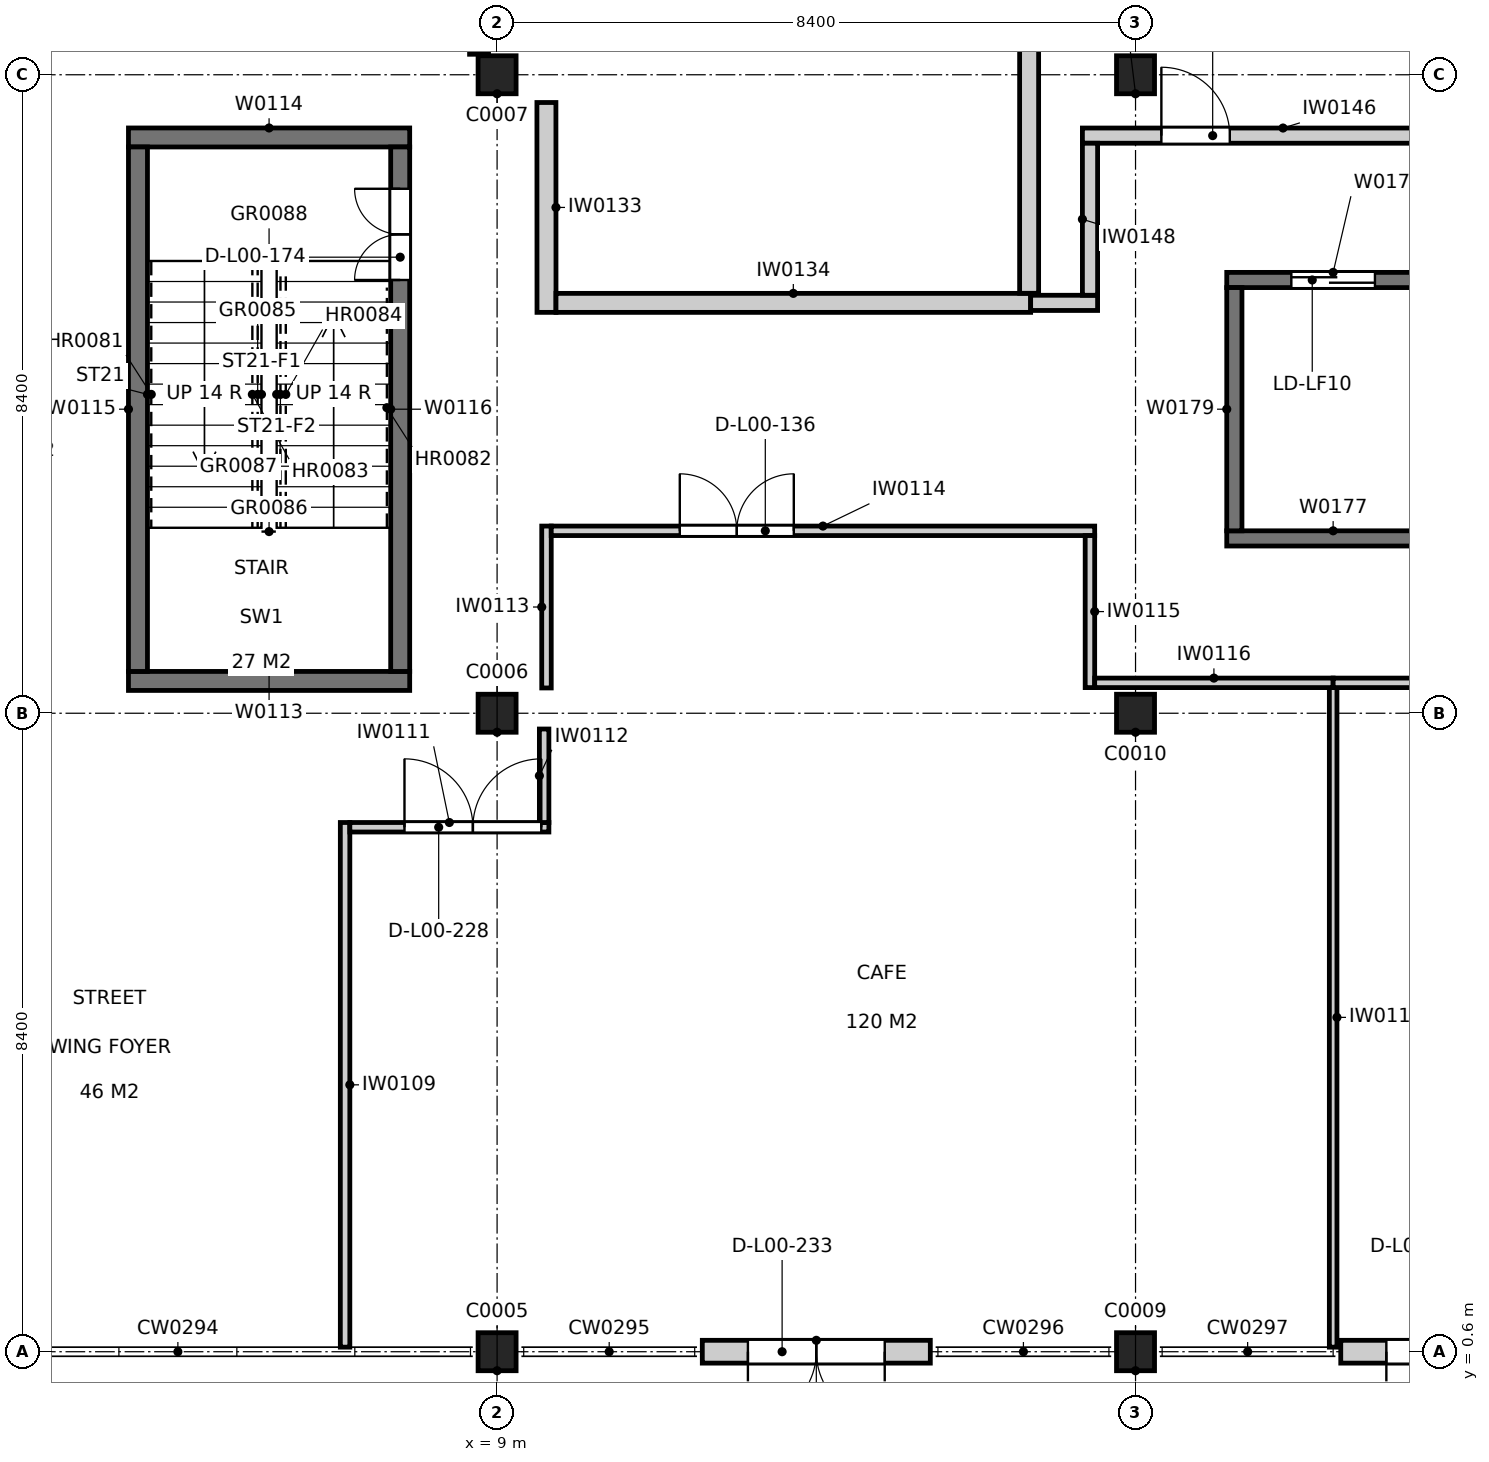
"""IFC4 building model, lengths in metres.
Left out: names, types, materials, properties, quantities, classifications, styles, units other than length and angle.
Written with IfcOpenShell. Run it as: python <this file> out.ifc"""

import sys

from ifc_helpers import new_model, si_unit, direction, frame, frame_2d, origin, origin_2d, place, context, subcontext, project, spatial, rectangle, extrude, element, fill, save


model = new_model("IFC4")
c1 = context("Model", 3, precision=1e-05, world=origin(), true_north=direction((0.0, 1.0)))
c2 = subcontext(c1, "Body", "Model", "MODEL_VIEW")
j1 = project(units=[si_unit("LENGTHUNIT", "METRE"), si_unit("PLANEANGLEUNIT", "RADIAN")], contexts=[c1])
p1 = place(None, origin())
s1 = spatial("IfcSite", under=j1, at=p1, CompositionType="ELEMENT")
p2 = place(p1, origin())
s2 = spatial("IfcBuilding", under=s1, at=p2, CompositionType="ELEMENT")
p3 = place(p2, origin())
s3 = spatial("IfcBuildingStorey", under=s2, at=p3, CompositionType="ELEMENT", Elevation=0.0)
for number, where, z_axis, x_axis in (
    (1, (9.0, 0.6, 0.0), (0.0, 0.0, 1.0), (1.0, 0.0, 0.0)),
    (2, (9.0, 9.0, 0.0), (0.0, 0.0, 1.0), (1.0, 0.0, 0.0)),
    (3, (9.0, 17.4, 0.0), (0.0, 0.0, 1.0), (1.0, 0.0, 0.0)),
    (4, (17.4, 0.6, 0.0), (0.0, 0.0, 1.0), (1.0, 0.0, 0.0)),
    (5, (17.4, 9.0, 0.0), (0.0, 0.0, 1.0), (1.0, 0.0, 0.0)),
    (6, (17.4, 17.4, 0.0), (0.0, 0.0, 1.0), (1.0, 0.0, 0.0)),
):
    element("IfcColumn", number, at=place(p3, frame(where, z_axis=z_axis, x_axis=x_axis)), inside=s3, PredefinedType="COLUMN", context=c2, shape_type="SweptSolid", body=[
        extrude(rectangle(XDim=0.5, YDim=0.5, at=origin_2d()), origin(), (0.0, 0.0, 1.0), 4.8),
    ])
for number, where, z_axis, x_axis in (
    (7, (4.15, 9.425, 0.0), (0.0, 0.0, 1.0), (1.0, 0.0, 0.0)),
    (8, (4.15, 16.575, 0.0), (0.0, 0.0, 1.0), (1.0, 0.0, 0.0)),
):
    element("IfcWall", number, at=place(p3, frame(where, z_axis=z_axis, x_axis=x_axis)), inside=s3, PredefinedType="SOLIDWALL", context=c2, shape_type="SweptSolid", body=[
        extrude(rectangle(XDim=3.7, YDim=0.25, at=frame_2d((1.85, 0.0))), origin(), (0.0, 0.0, 1.0), 4.8),
    ])
p4 = place(p3, frame((4.275, 9.55, 0.0), z_axis=(0.0, 0.0, 1.0), x_axis=(0.0, 1.0, 0.0)))
e9 = element("IfcWall", 9, at=p4, inside=s3, PredefinedType="SOLIDWALL", context=c2, shape_type="SweptSolid", body=[
    extrude(rectangle(XDim=6.9, YDim=0.25, at=frame_2d((3.45, 0.0))), origin(), (0.0, 0.0, 1.0), 4.8),
])
p5 = place(p3, frame((7.725, 9.55, 0.0), z_axis=(0.0, 0.0, 1.0), x_axis=(0.0, 1.0, 0.0)))
e10 = element("IfcWall", 10, at=p5, inside=s3, PredefinedType="SOLIDWALL", context=c2, shape_type="SweptSolid", body=[
    extrude(rectangle(XDim=6.9, YDim=0.25, at=frame_2d((3.45, 0.0))), origin(), (0.0, 0.0, 1.0), 4.8),
])
p6 = place(p5, frame((5.15, 0.0, 0.0)))
e11 = element("IfcOpeningElement", 11, at=p6, cuts=e10, PredefinedType="OPENING", context=c2, shape_type="SweptSolid", body=[
    extrude(rectangle(XDim=1.2, YDim=2.1, at=frame_2d((0.6, 1.05))), frame((0.0, 0.135, 0.0), z_axis=(0.0, -1.0, 0.0), x_axis=(1.0, 0.0, 0.0)), (0.0, 0.0, 1.0), 0.27),
])
p7 = place(p3, frame((18.6, 11.3, 0.0), z_axis=(0.0, 0.0, 1.0), x_axis=(1.0, 0.0, 0.0)))
e12 = element("IfcWall", 12, at=p7, inside=s3, PredefinedType="SOLIDWALL", context=c2, shape_type="SweptSolid", body=[
    extrude(rectangle(XDim=2.8, YDim=0.2, at=frame_2d((1.4, 0.0))), origin(), (0.0, 0.0, 1.0), 4.8),
])
p8 = place(p3, frame((18.6, 14.7, 0.0), z_axis=(0.0, 0.0, 1.0), x_axis=(1.0, 0.0, 0.0)))
e13 = element("IfcWall", 13, at=p8, inside=s3, PredefinedType="SOLIDWALL", context=c2, shape_type="SweptSolid", body=[
    extrude(rectangle(XDim=2.8, YDim=0.2, at=frame_2d((1.4, 0.0))), origin(), (0.0, 0.0, 1.0), 4.8),
])
p9 = place(p8, frame((0.85, 0.0, 0.0)))
e14 = element("IfcOpeningElement", 14, at=p9, cuts=e13, PredefinedType="OPENING", context=c2, shape_type="SweptSolid", body=[
    extrude(rectangle(XDim=1.1, YDim=2.1, at=frame_2d((0.55, 1.05))), frame((0.0, 0.11, 0.0), z_axis=(0.0, -1.0, 0.0), x_axis=(1.0, 0.0, 0.0)), (0.0, 0.0, 1.0), 0.22),
])
p10 = place(p3, frame((18.7, 11.4, 0.0), z_axis=(0.0, 0.0, 1.0), x_axis=(0.0, 1.0, 0.0)))
e15 = element("IfcWall", 15, at=p10, inside=s3, PredefinedType="SOLIDWALL", context=c2, shape_type="SweptSolid", body=[
    extrude(rectangle(XDim=3.2, YDim=0.2, at=frame_2d((1.6, 0.0))), origin(), (0.0, 0.0, 1.0), 4.8),
])
p11 = place(p3, frame((7.0, 7.562, 0.0), z_axis=(0.0, 0.0, 1.0), x_axis=(0.0, -1.0, 0.0)))
e16 = element("IfcWall", 16, at=p11, inside=s3, PredefinedType="PARTITIONING", context=c2, shape_type="SweptSolid", body=[
    extrude(rectangle(XDim=6.902, YDim=0.125, at=frame_2d((3.451, 0.0))), origin(), (0.0, 0.0, 1.0), 4.04),
])
p12 = place(p3, frame((20.0, 9.337, 0.0), z_axis=(0.0, 0.0, 1.0), x_axis=(0.0, -1.0, 0.0)))
e17 = element("IfcWall", 17, at=p12, inside=s3, PredefinedType="PARTITIONING", context=c2, shape_type="SweptSolid", body=[
    extrude(rectangle(XDim=8.677, YDim=0.1, at=frame_2d((4.339, 0.0))), origin(), (0.0, 0.0, 1.0), 3.84),
])
p13 = place(p3, frame((7.062, 7.5, 0.0), z_axis=(0.0, 0.0, 1.0), x_axis=(1.0, 0.0, 0.0)))
e18 = element("IfcWall", 18, at=p13, inside=s3, PredefinedType="PARTITIONING", context=c2, shape_type="SweptSolid", body=[
    extrude(rectangle(XDim=2.619, YDim=0.125, at=frame_2d((1.31, 0.0))), origin(), (0.0, 0.0, 1.0), 3.84),
])
p14 = place(p13, frame((0.719, 0.0, 0.0)))
e19 = element("IfcOpeningElement", 19, at=p14, cuts=e18, PredefinedType="OPENING", context=c2, shape_type="SweptSolid", body=[
    extrude(rectangle(XDim=1.8, YDim=2.1, at=frame_2d((0.9, 1.05))), frame((0.0, 0.073, 0.0), z_axis=(0.0, -1.0, 0.0), x_axis=(1.0, 0.0, 0.0)), (0.0, 0.0, 1.0), 0.145),
])
p15 = place(p3, frame((9.619, 7.562, 0.0), z_axis=(0.0, 0.0, 1.0), x_axis=(0.0, 1.0, 0.0)))
e20 = element("IfcWall", 20, at=p15, inside=s3, PredefinedType="PARTITIONING", context=c2, shape_type="SweptSolid", body=[
    extrude(rectangle(XDim=1.23, YDim=0.125, at=frame_2d((0.615, 0.0))), origin(), (0.0, 0.0, 1.0), 4.64),
])
p16 = place(p3, frame((9.65, 9.333, 0.0), z_axis=(0.0, 0.0, 1.0), x_axis=(0.0, 1.0, 0.0)))
e21 = element("IfcWall", 21, at=p16, inside=s3, PredefinedType="PARTITIONING", context=c2, shape_type="SweptSolid", body=[
    extrude(rectangle(XDim=2.13, YDim=0.125, at=frame_2d((1.065, 0.0))), origin(), (0.0, 0.0, 1.0), 4.64),
])
p17 = place(p3, frame((9.712, 11.4, 0.0), z_axis=(0.0, 0.0, 1.0), x_axis=(1.0, 0.0, 0.0)))
e22 = element("IfcWall", 22, at=p17, inside=s3, PredefinedType="PARTITIONING", context=c2, shape_type="SweptSolid", body=[
    extrude(rectangle(XDim=7.15, YDim=0.125, at=frame_2d((3.575, 0.0))), origin(), (0.0, 0.0, 1.0), 4.64),
])
p18 = place(p17, frame((1.691, 0.0, 0.0)))
e23 = element("IfcOpeningElement", 23, at=p18, cuts=e22, PredefinedType="OPENING", context=c2, shape_type="SweptSolid", body=[
    extrude(rectangle(XDim=1.5, YDim=2.1, at=frame_2d((0.75, 1.05))), frame((0.0, 0.073, 0.0), z_axis=(0.0, -1.0, 0.0), x_axis=(1.0, 0.0, 0.0)), (0.0, 0.0, 1.0), 0.145),
])
p19 = place(p3, frame((16.8, 11.337, 0.0), z_axis=(0.0, 0.0, 1.0), x_axis=(0.0, -1.0, 0.0)))
e24 = element("IfcWall", 24, at=p19, inside=s3, PredefinedType="PARTITIONING", context=c2, shape_type="SweptSolid", body=[
    extrude(rectangle(XDim=2.0, YDim=0.125, at=frame_2d((1.0, 0.0))), origin(), (0.0, 0.0, 1.0), 4.64),
])
p20 = place(p3, frame((16.863, 9.4, 0.0), z_axis=(0.0, 0.0, 1.0), x_axis=(1.0, 0.0, 0.0)))
e25 = element("IfcWall", 25, at=p20, inside=s3, PredefinedType="PARTITIONING", context=c2, shape_type="SweptSolid", body=[
    extrude(rectangle(XDim=3.137, YDim=0.125, at=frame_2d((1.569, 0.0))), origin(), (0.0, 0.0, 1.0), 3.84),
])
p21 = place(p3, frame((20.0, 9.4, 0.0), z_axis=(0.0, 0.0, 1.0), x_axis=(1.0, 0.0, 0.0)))
e26 = element("IfcWall", 26, at=p21, inside=s3, PredefinedType="PARTITIONING", context=c2, shape_type="SweptSolid", body=[
    extrude(rectangle(XDim=3.262, YDim=0.125, at=frame_2d((1.631, 0.0))), origin(), (0.0, 0.0, 1.0), 4.64),
])
p22 = place(p21, frame((1.436, 0.0, 0.0)))
e27 = element("IfcOpeningElement", 27, at=p22, cuts=e26, PredefinedType="OPENING", context=c2, shape_type="SweptSolid", body=[
    extrude(rectangle(XDim=1.5, YDim=2.1, at=frame_2d((0.75, 1.05))), frame((0.0, 0.073, 0.0), z_axis=(0.0, -1.0, 0.0), x_axis=(1.0, 0.0, 0.0)), (0.0, 0.0, 1.0), 0.145),
])
p23 = place(p3, frame((8.76, 18.624, 0.0), z_axis=(0.0, 0.0, 1.0), x_axis=(0.0035823721, -0.999993583284, 0.0)))
e28 = element("IfcWall", 28, at=p23, inside=s3, PredefinedType="PARTITIONING", context=c2, shape_type="SweptSolid", body=[
    extrude(rectangle(XDim=0.954, YDim=0.25, at=frame_2d((0.477, 0.0))), origin(), (0.0, 0.0, 1.0), 3.84),
])
p24 = place(p3, frame((9.649, 17.035, 0.0), z_axis=(0.0, 0.0, 1.0), x_axis=(0.000442125697, -0.999999902262, 0.0)))
e29 = element("IfcWall", 29, at=p24, inside=s3, PredefinedType="PARTITIONING", context=c2, shape_type="SweptSolid", body=[
    extrude(rectangle(XDim=2.761, YDim=0.25, at=frame_2d((1.38, 0.0))), origin(), (0.0, 0.0, 1.0), 4.04),
])
p25 = place(p3, frame((9.775, 14.399, 0.0), z_axis=(0.0, 0.0, 1.0), x_axis=(1.0, 0.0, 0.0)))
e30 = element("IfcWall", 30, at=p25, inside=s3, PredefinedType="PARTITIONING", context=c2, shape_type="SweptSolid", body=[
    extrude(rectangle(XDim=6.245, YDim=0.25, at=frame_2d((3.123, 0.0))), origin(), (0.0, 0.0, 1.0), 4.04),
])
p26 = place(p3, frame((16.701, 16.599, 0.0), z_axis=(0.0, 0.0, 1.0), x_axis=(1.0, 0.0, 0.0)))
e31 = element("IfcWall", 31, at=p26, inside=s3, PredefinedType="PARTITIONING", context=c2, shape_type="SweptSolid", body=[
    extrude(rectangle(XDim=5.279, YDim=0.2, at=frame_2d((2.64, 0.0))), origin(), (0.0, 0.0, 1.0), 3.84),
])
p27 = place(p26, frame((1.039, 0.0, 0.0)))
e32 = element("IfcOpeningElement", 32, at=p27, cuts=e31, PredefinedType="OPENING", context=c2, shape_type="SweptSolid", body=[
    extrude(rectangle(XDim=0.9, YDim=2.1, at=frame_2d((0.45, 1.05))), frame((0.0, 0.11, 0.0), z_axis=(0.0, -1.0, 0.0), x_axis=(1.0, 0.0, 0.0)), (0.0, 0.0, 1.0), 0.22),
])
p28 = place(p3, frame((16.02, 14.399, 0.0), z_axis=(0.0, 0.0, 1.0), x_axis=(1.0, 0.0, 0.0)))
e33 = element("IfcWall", 33, at=p28, inside=s3, PredefinedType="PARTITIONING", context=c2, shape_type="SweptSolid", body=[
    extrude(rectangle(XDim=0.881, YDim=0.2, at=frame_2d((0.44, 0.0))), origin(), (0.0, 0.0, 1.0), 4.04),
])
p29 = place(p3, frame((16.801, 14.499, 0.0), z_axis=(0.0, 0.0, 1.0), x_axis=(0.0, 1.0, 0.0)))
e34 = element("IfcWall", 34, at=p29, inside=s3, PredefinedType="PARTITIONING", context=c2, shape_type="SweptSolid", body=[
    extrude(rectangle(XDim=2.0, YDim=0.2, at=frame_2d((1.0, 0.0))), origin(), (0.0, 0.0, 1.0), 4.04),
])
p30 = place(p3, frame((16.0, 25.6, 0.0), z_axis=(0.0, 0.0, 1.0), x_axis=(0.0, -1.0, 0.0)))
e35 = element("IfcWall", 35, at=p30, inside=s3, PredefinedType="PARTITIONING", context=c2, shape_type="SweptSolid", body=[
    extrude(rectangle(XDim=11.075, YDim=0.25, at=frame_2d((5.538, 0.0))), origin(), (0.0, 0.0, 1.0), 3.84),
])
p31 = place(p3, frame((11.7, 0.6, 0.0), z_axis=(0.0, 0.0, 1.0), x_axis=(1.0, 0.0, 0.0)))
e36 = element("IfcWall", 36, at=p31, inside=s3, PredefinedType="SOLIDWALL", context=c2, shape_type="SweptSolid", body=[
    extrude(rectangle(XDim=3.0, YDim=0.3, at=frame_2d((1.5, 0.0))), origin(), (0.0, 0.0, 1.0), 3.84),
])
p32 = place(p31, frame((2.4, 0.0, 0.0), z_axis=(0.0, 0.0, 1.0), x_axis=(-1.0, 0.0, 0.0)))
e37 = element("IfcOpeningElement", 37, at=p32, cuts=e36, PredefinedType="OPENING", context=c2, shape_type="SweptSolid", body=[
    extrude(rectangle(XDim=1.8, YDim=2.1, at=frame_2d((0.9, 1.05))), frame((0.0, 0.16, 0.0), z_axis=(0.0, -1.0, 0.0), x_axis=(1.0, 0.0, 0.0)), (0.0, 0.0, 1.0), 0.32),
])
p33 = place(p3, frame((20.1, 0.6, 0.0), z_axis=(0.0, 0.0, 1.0), x_axis=(1.0, 0.0, 0.0)))
e38 = element("IfcWall", 38, at=p33, inside=s3, PredefinedType="SOLIDWALL", context=c2, shape_type="SweptSolid", body=[
    extrude(rectangle(XDim=3.0, YDim=0.3, at=frame_2d((1.5, 0.0))), origin(), (0.0, 0.0, 1.0), 3.84),
])
p34 = place(p33, frame((2.4, 0.0, 0.0), z_axis=(0.0, 0.0, 1.0), x_axis=(-1.0, 0.0, 0.0)))
e39 = element("IfcOpeningElement", 39, at=p34, cuts=e38, PredefinedType="OPENING", context=c2, shape_type="SweptSolid", body=[
    extrude(rectangle(XDim=1.8, YDim=2.1, at=frame_2d((0.9, 1.05))), frame((0.0, 0.16, 0.0), z_axis=(0.0, -1.0, 0.0), x_axis=(1.0, 0.0, 0.0)), (0.0, 0.0, 1.0), 0.32),
])
p35 = place(p18, origin())
e40 = element("IfcDoor", 40, at=p35, inside=s3, OperationType="DOUBLE_DOOR_SINGLE_SWING", PredefinedType="DOOR", context=c2, shape_type="SweptSolid", body=[
    extrude(rectangle(XDim=1.5, YDim=2.1, at=frame_2d((0.75, 1.05))), frame((0.0, 0.025, 0.0), z_axis=(0.0, -1.0, 0.0), x_axis=(1.0, 0.0, 0.0)), (0.0, 0.0, 1.0), 0.05),
])
fill(e23, e40)
p36 = place(p27, origin())
e41 = element("IfcDoor", 41, at=p36, inside=s3, OperationType="SINGLE_SWING_LEFT", PredefinedType="DOOR", context=c2, shape_type="SweptSolid", body=[
    extrude(rectangle(XDim=0.9, YDim=2.1, at=frame_2d((0.45, 1.05))), frame((0.0, 0.025, 0.0), z_axis=(0.0, -1.0, 0.0), x_axis=(1.0, 0.0, 0.0)), (0.0, 0.0, 1.0), 0.05),
])
fill(e32, e41)
p37 = place(p6, origin())
e42 = element("IfcDoor", 42, at=p37, inside=s3, OperationType="DOUBLE_DOOR_SINGLE_SWING", PredefinedType="DOOR", context=c2, shape_type="SweptSolid", body=[
    extrude(rectangle(XDim=1.2, YDim=2.1, at=frame_2d((0.6, 1.05))), frame((0.0, 0.025, 0.0), z_axis=(0.0, -1.0, 0.0), x_axis=(1.0, 0.0, 0.0)), (0.0, 0.0, 1.0), 0.05),
])
fill(e11, e42)
p38 = place(p14, origin())
e43 = element("IfcDoor", 43, at=p38, inside=s3, OperationType="DOUBLE_DOOR_SINGLE_SWING", PredefinedType="DOOR", context=c2, shape_type="SweptSolid", body=[
    extrude(rectangle(XDim=1.8, YDim=2.1, at=frame_2d((0.9, 1.05))), frame((0.0, 0.025, 0.0), z_axis=(0.0, -1.0, 0.0), x_axis=(1.0, 0.0, 0.0)), (0.0, 0.0, 1.0), 0.05),
])
fill(e19, e43)
p39 = place(p32, origin())
e44 = element("IfcDoor", 44, at=p39, inside=s3, OperationType="DOUBLE_DOOR_SINGLE_SWING", PredefinedType="DOOR", context=c2, shape_type="SweptSolid", body=[
    extrude(rectangle(XDim=1.8, YDim=2.1, at=frame_2d((0.9, 1.05))), frame((0.0, 0.025, 0.0), z_axis=(0.0, -1.0, 0.0), x_axis=(1.0, 0.0, 0.0)), (0.0, 0.0, 1.0), 0.05),
])
fill(e37, e44)
p40 = place(p34, origin())
e45 = element("IfcDoor", 45, at=p40, inside=s3, OperationType="DOUBLE_DOOR_SINGLE_SWING", PredefinedType="DOOR", context=c2, shape_type="SweptSolid", body=[
    extrude(rectangle(XDim=1.8, YDim=2.1, at=frame_2d((0.9, 1.05))), frame((0.0, 0.025, 0.0), z_axis=(0.0, -1.0, 0.0), x_axis=(1.0, 0.0, 0.0)), (0.0, 0.0, 1.0), 0.05),
])
fill(e39, e45)
p41 = place(p9, origin())
e46 = element("IfcDoor", 46, at=p41, inside=s3, OperationType="SLIDING_TO_LEFT", PredefinedType="DOOR", context=c2, shape_type="SweptSolid", body=[
    extrude(rectangle(XDim=1.1, YDim=2.1, at=frame_2d((0.55, 1.05))), frame((0.0, 0.025, 0.0), z_axis=(0.0, -1.0, 0.0), x_axis=(1.0, 0.0, 0.0)), (0.0, 0.0, 1.0), 0.05),
])
fill(e14, e46)
save(model, sys.argv[1])
